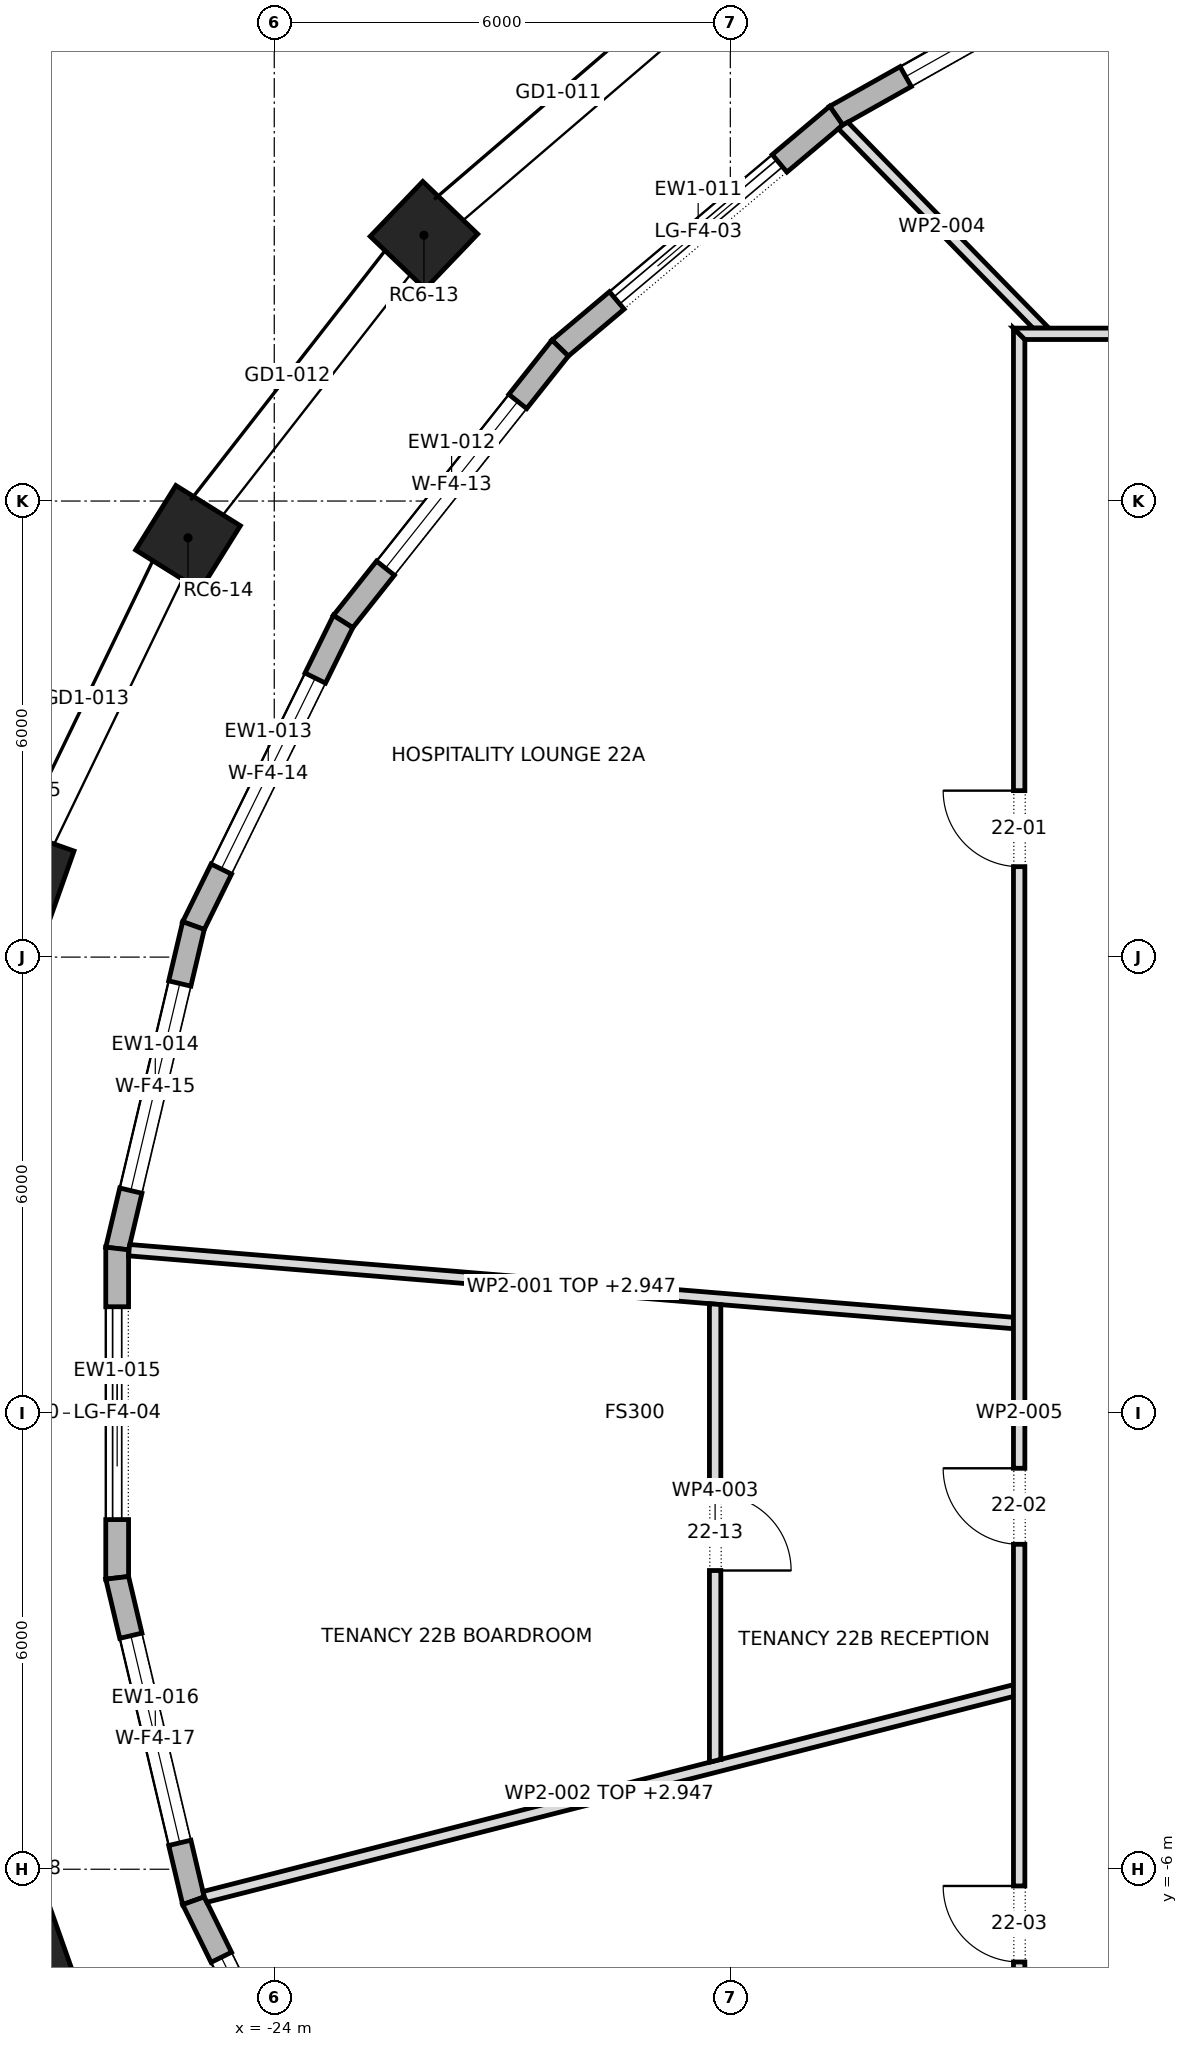
"""IFC4 building model, lengths in metres.
Left out: names, types, materials, properties, quantities, classifications, styles, units other than length and angle.
Written with IfcOpenShell. Run it as: python <this file> out.ifc"""

import sys

from ifc_helpers import new_model, si_unit, direction, frame, frame_2d, origin, origin_2d, place, context, subcontext, project, spatial, polyline, rectangle, outline, extrude, element, fill, save


model = new_model("IFC4")
c1 = context("Model", 3, precision=1e-05, world=origin(), true_north=direction((0.0, 1.0)))
c2 = subcontext(c1, "Body", "Model", "MODEL_VIEW")
j1 = project(units=[si_unit("LENGTHUNIT", "METRE"), si_unit("PLANEANGLEUNIT", "RADIAN")], contexts=[c1])
p1 = place(None, origin())
s1 = spatial("IfcSite", under=j1, at=p1, CompositionType="ELEMENT")
p2 = place(p1, origin())
s2 = spatial("IfcBuilding", under=s1, at=p2, CompositionType="ELEMENT")
p3 = place(p2, frame((0.0, 0.0, 312.3)))
s3 = spatial("IfcBuildingStorey", under=s2, at=p3, CompositionType="ELEMENT", Elevation=312.3)
for number, where, z_axis, x_axis in (
    (1, (-22.031, 15.497, 0.0), (0.0, 0.0, 1.0), (-0.692, -0.722, 0.0)),
    (2, (-25.135, 11.516, 0.0), (0.0, 0.0, 1.0), (-0.529, -0.849, 0.0)),
    (3, (-27.273, 7.091, 0.0), (0.0, 0.0, 1.0), (-0.334, -0.943, 0.0)),
    (4, (-27.273, -7.091, 0.0), (0.0, 0.0, 1.0), (0.334, -0.943, 0.0)),
):
    element("IfcColumn", number, at=place(p3, frame(where, z_axis=z_axis, x_axis=x_axis)), inside=s3, PredefinedType="COLUMN", context=c2, shape_type="SweptSolid", body=[
        extrude(rectangle(XDim=1.0, YDim=1.0, at=origin_2d()), origin(), (0.0, 0.0, 1.0), 4.0),
    ])
p4 = place(p3, frame((-12.338, 19.471, 0.0), z_axis=(0.0, 0.0, 1.0), x_axis=(-0.871570211895, -0.490270706588, 0.0)))
e5 = element("IfcWall", 5, at=p4, inside=s3, PredefinedType="STANDARD", context=c2, shape_type="SweptSolid", body=[
    extrude(outline(polyline([(-0.013, -0.15), (4.912, -0.15), (4.883, 0.15), (0.013, 0.15), (-0.013, -0.15)])), origin(), (0.0, 0.0, 1.0), 3.7),
])
p5 = place(p4, frame((1.049, 0.0, 0.6)))
e6 = element("IfcOpeningElement", 6, at=p5, cuts=e5, PredefinedType="OPENING", context=c2, shape_type="SweptSolid", body=[
    extrude(rectangle(XDim=2.8, YDim=2.65, at=frame_2d((1.4, 1.325))), frame((0.0, 0.162, 0.0), z_axis=(0.0, -1.0, 0.0), x_axis=(1.0, 0.0, 0.0)), (0.0, 0.0, 1.0), 0.324),
])
p6 = place(p3, frame((-16.607, 17.07, 0.0), z_axis=(0.0, 0.0, 1.0), x_axis=(-0.765059193792, -0.643959959931, 0.0)))
e7 = element("IfcWall", 7, at=p6, inside=s3, PredefinedType="STANDARD", context=c2, shape_type="SweptSolid", body=[
    extrude(outline(polyline([(-0.014, -0.15), (4.763, -0.15), (4.733, 0.15), (0.014, 0.15), (-0.014, -0.15)])), origin(), (0.0, 0.0, 1.0), 3.7),
])
p7 = place(p6, frame((0.974, 0.0, 0.0)))
e8 = element("IfcOpeningElement", 8, at=p7, cuts=e7, PredefinedType="OPENING", context=c2, shape_type="SweptSolid", body=[
    extrude(rectangle(XDim=2.8, YDim=3.25, at=frame_2d((1.4, 1.625))), frame((0.0, 0.162, 0.0), z_axis=(0.0, -1.0, 0.0), x_axis=(1.0, 0.0, 0.0)), (0.0, 0.0, 1.0), 0.324),
])
p8 = place(p3, frame((-20.239, 14.012, 0.0), z_axis=(0.0, 0.0, 1.0), x_axis=(-0.621682706372, -0.78326918272, 0.0)))
e9 = element("IfcWall", 9, at=p8, inside=s3, PredefinedType="STANDARD", context=c2, shape_type="SweptSolid", body=[
    extrude(outline(polyline([(-0.015, -0.15), (4.609, -0.15), (4.577, 0.15), (0.015, 0.15), (-0.015, -0.15)])), origin(), (0.0, 0.0, 1.0), 3.7),
])
p9 = place(p8, frame((0.896, 0.0, 0.6)))
e10 = element("IfcOpeningElement", 10, at=p9, cuts=e9, PredefinedType="OPENING", context=c2, shape_type="SweptSolid", body=[
    extrude(rectangle(XDim=2.8, YDim=2.65, at=frame_2d((1.4, 1.325))), frame((0.0, 0.162, 0.0), z_axis=(0.0, -1.0, 0.0), x_axis=(1.0, 0.0, 0.0)), (0.0, 0.0, 1.0), 0.324),
])
p10 = place(p3, frame((-23.094, 10.415, 0.0), z_axis=(0.0, 0.0, 1.0), x_axis=(-0.441509050872, -0.897256796017, 0.0)))
e11 = element("IfcWall", 11, at=p10, inside=s3, PredefinedType="STANDARD", context=c2, shape_type="SweptSolid", body=[
    extrude(outline(polyline([(-0.016, -0.15), (4.475, -0.15), (4.441, 0.15), (0.016, 0.15), (-0.016, -0.15)])), origin(), (0.0, 0.0, 1.0), 3.7),
])
p11 = place(p10, frame((0.829, 0.0, 0.6)))
e12 = element("IfcOpeningElement", 12, at=p11, cuts=e11, PredefinedType="OPENING", context=c2, shape_type="SweptSolid", body=[
    extrude(rectangle(XDim=2.8, YDim=2.65, at=frame_2d((1.4, 1.325))), frame((0.0, 0.162, 0.0), z_axis=(0.0, -1.0, 0.0), x_axis=(1.0, 0.0, 0.0)), (0.0, 0.0, 1.0), 0.324),
])
p12 = place(p3, frame((-25.063, 6.415, 0.0), z_axis=(0.0, 0.0, 1.0), x_axis=(-0.229974411334, -0.973196675977, 0.0)))
e13 = element("IfcWall", 13, at=p12, inside=s3, PredefinedType="STANDARD", context=c2, shape_type="SweptSolid", body=[
    extrude(outline(polyline([(-0.017, -0.15), (4.383, -0.15), (4.348, 0.15), (0.017, 0.15), (-0.017, -0.15)])), origin(), (0.0, 0.0, 1.0), 3.7),
])
p13 = place(p12, frame((0.783, 0.0, 0.6)))
e14 = element("IfcOpeningElement", 14, at=p13, cuts=e13, PredefinedType="OPENING", context=c2, shape_type="SweptSolid", body=[
    extrude(rectangle(XDim=2.8, YDim=2.65, at=frame_2d((1.4, 1.325))), frame((0.0, 0.162, 0.0), z_axis=(0.0, -1.0, 0.0), x_axis=(1.0, 0.0, 0.0)), (0.0, 0.0, 1.0), 0.324),
])
p14 = place(p3, frame((-26.067, 2.166, 0.0), z_axis=(0.0, 0.0, 1.0), x_axis=(0.0, -1.0, 0.0)))
e15 = element("IfcWall", 15, at=p14, inside=s3, PredefinedType="STANDARD", context=c2, shape_type="SweptSolid", body=[
    extrude(outline(polyline([(-0.018, -0.15), (4.35, -0.15), (4.315, 0.15), (0.018, 0.15), (-0.018, -0.15)])), origin(), (0.0, 0.0, 1.0), 3.7),
])
p15 = place(p14, frame((0.766, 0.0, 0.0)))
e16 = element("IfcOpeningElement", 16, at=p15, cuts=e15, PredefinedType="OPENING", context=c2, shape_type="SweptSolid", body=[
    extrude(rectangle(XDim=2.8, YDim=3.25, at=frame_2d((1.4, 1.625))), frame((0.0, 0.162, 0.0), z_axis=(0.0, -1.0, 0.0), x_axis=(1.0, 0.0, 0.0)), (0.0, 0.0, 1.0), 0.324),
])
p16 = place(p3, frame((-26.067, -2.166, 0.0), z_axis=(0.0, 0.0, 1.0), x_axis=(0.229974411334, -0.973196675977, 0.0)))
e17 = element("IfcWall", 17, at=p16, inside=s3, PredefinedType="STANDARD", context=c2, shape_type="SweptSolid", body=[
    extrude(outline(polyline([(-0.018, -0.15), (4.382, -0.15), (4.348, 0.15), (0.018, 0.15), (-0.018, -0.15)])), origin(), (0.0, 0.0, 1.0), 3.7),
])
p17 = place(p16, frame((0.783, 0.0, 0.6)))
e18 = element("IfcOpeningElement", 18, at=p17, cuts=e17, PredefinedType="OPENING", context=c2, shape_type="SweptSolid", body=[
    extrude(rectangle(XDim=2.8, YDim=2.65, at=frame_2d((1.4, 1.325))), frame((0.0, 0.162, 0.0), z_axis=(0.0, -1.0, 0.0), x_axis=(1.0, 0.0, 0.0)), (0.0, 0.0, 1.0), 0.324),
])
p18 = place(p3, frame((-25.063, -6.415, 0.0), z_axis=(0.0, 0.0, 1.0), x_axis=(0.441509050872, -0.897256796017, 0.0)))
e19 = element("IfcWall", 19, at=p18, inside=s3, PredefinedType="STANDARD", context=c2, shape_type="SweptSolid", body=[
    extrude(outline(polyline([(-0.017, -0.15), (4.474, -0.15), (4.442, 0.15), (0.017, 0.15), (-0.017, -0.15)])), origin(), (0.0, 0.0, 1.0), 3.7),
])
p19 = place(p18, frame((0.829, 0.0, 0.6)))
e20 = element("IfcOpeningElement", 20, at=p19, cuts=e19, PredefinedType="OPENING", context=c2, shape_type="SweptSolid", body=[
    extrude(rectangle(XDim=2.8, YDim=2.65, at=frame_2d((1.4, 1.325))), frame((0.0, 0.162, 0.0), z_axis=(0.0, -1.0, 0.0), x_axis=(1.0, 0.0, 0.0)), (0.0, 0.0, 1.0), 0.324),
])
p20 = place(p3, frame((-25.91, 2.145, 0.0), z_axis=(0.0, 0.0, 1.0), x_axis=(0.996625584757, -0.082081933503, 0.0)))
e21 = element("IfcWall", 21, at=p20, inside=s3, PredefinedType="PARTITIONING", context=c2, shape_type="SweptSolid", body=[
    extrude(outline(polyline([(11.68, -0.075), (11.68, -0.068), (11.668, 0.075), (9.724, 0.075), (7.78, 0.075), (5.836, 0.075), (3.892, 0.075), (1.948, 0.075), (0.004, 0.075), (0.0, 0.049), (0.0, -0.075), (1.947, -0.075), (3.893, -0.075), (5.84, -0.075), (7.787, -0.075), (9.733, -0.075), (11.68, -0.075)])), origin(), (0.0, 0.0, 1.0), 2.947),
])
p21 = place(p3, frame((-24.919, -6.365, 0.0), z_axis=(0.0, 0.0, 1.0), x_axis=(0.968945878768, 0.247272893819, 0.0)))
e22 = element("IfcWall", 22, at=p21, inside=s3, PredefinedType="PARTITIONING", context=c2, shape_type="SweptSolid", body=[
    extrude(outline(polyline([(0.015, -0.075), (1.84, -0.075), (3.665, -0.075), (5.49, -0.075), (7.315, -0.075), (9.141, -0.075), (10.966, -0.075), (11.004, 0.075), (11.004, 0.075), (9.017, 0.075), (7.031, 0.075), (7.031, 0.074), (7.028, 0.075), (5.271, 0.075), (3.514, 0.075), (1.757, 0.075), (0.0, 0.075), (0.0, -0.005), (0.015, -0.075)])), origin(), (0.0, 0.0, 1.0), 2.947),
])
p22 = place(p3, frame((-18.2, -4.593, 0.0), z_axis=(0.0, 0.0, 1.0), x_axis=(0.0, 1.0, 0.0)))
e23 = element("IfcWall", 23, at=p22, inside=s3, PredefinedType="PARTITIONING", context=c2, shape_type="SweptSolid", body=[
    extrude(outline(polyline([(0.038, -0.075), (2.032, -0.075), (4.026, -0.075), (6.021, -0.075), (6.032, 0.07), (6.032, 0.075), (4.524, 0.075), (3.016, 0.075), (1.508, 0.075), (0.0, 0.075), (0.0, 0.075), (0.038, -0.075)])), origin(), (0.0, 0.0, 1.0), 3.7),
])
p23 = place(p22, frame((2.522, 0.0, 0.0)))
e24 = element("IfcOpeningElement", 24, at=p23, cuts=e23, PredefinedType="OPENING", context=c2, shape_type="SweptSolid", body=[
    extrude(rectangle(XDim=1.0, YDim=2.1, at=frame_2d((0.5, 1.05))), frame((0.0, 0.087, 0.0), z_axis=(0.0, -1.0, 0.0), x_axis=(1.0, 0.0, 0.0)), (0.0, 0.0, 1.0), 0.174),
])
p24 = place(p3, frame((-16.525, 16.95, 0.0), z_axis=(0.0, 0.0, 1.0), x_axis=(0.698599984797, -0.715512446602, 0.0)))
e25 = element("IfcWall", 25, at=p24, inside=s3, PredefinedType="PARTITIONING", context=c2, shape_type="SweptSolid", body=[
    extrude(outline(polyline([(0.0, -0.075), (1.833, -0.075), (3.665, -0.075), (3.811, 0.075), (3.811, 0.075), (1.918, 0.075), (0.025, 0.075), (0.005, 0.0), (0.0, -0.074), (0.0, -0.075)])), origin(), (0.0, 0.0, 1.0), 3.7),
])
p25 = place(p3, frame((-14.2, -14.275, 0.0), z_axis=(0.0, 0.0, 1.0), x_axis=(0.0, 1.0, 0.0)))
e26 = element("IfcWall", 26, at=p25, inside=s3, PredefinedType="PARTITIONING", context=c2, shape_type="SweptSolid", body=[
    extrude(outline(polyline([(0.15, -0.075), (2.033, -0.075), (3.917, -0.075), (5.8, -0.075), (7.683, -0.075), (9.567, -0.075), (11.45, -0.075), (13.333, -0.075), (15.217, -0.075), (17.1, -0.075), (18.983, -0.075), (20.866, -0.075), (22.75, -0.075), (24.633, -0.075), (26.517, -0.075), (28.4, -0.075), (28.55, 0.075), (28.55, 0.075), (26.646, 0.075), (24.743, 0.075), (22.84, 0.075), (20.937, 0.075), (19.033, 0.075), (17.13, 0.075), (15.227, 0.075), (13.323, 0.075), (11.42, 0.075), (9.517, 0.075), (7.613, 0.075), (5.71, 0.075), (3.807, 0.075), (1.903, 0.075), (0.0, 0.075), (0.15, -0.075)])), origin(), (0.0, 0.0, 1.0), 3.7),
])
p26 = place(p25, frame((21.465, 0.0, 0.0)))
e27 = element("IfcOpeningElement", 27, at=p26, cuts=e26, PredefinedType="OPENING", context=c2, shape_type="SweptSolid", body=[
    extrude(rectangle(XDim=1.0, YDim=2.1, at=frame_2d((0.5, 1.05))), frame((0.0, 0.087, 0.0), z_axis=(0.0, -1.0, 0.0), x_axis=(1.0, 0.0, 0.0)), (0.0, 0.0, 1.0), 0.174),
])
p27 = place(p25, frame((12.55, 0.0, 0.0)))
e28 = element("IfcOpeningElement", 28, at=p27, cuts=e26, PredefinedType="OPENING", context=c2, shape_type="SweptSolid", body=[
    extrude(rectangle(XDim=1.0, YDim=2.1, at=frame_2d((0.5, 1.05))), frame((0.0, 0.087, 0.0), z_axis=(0.0, -1.0, 0.0), x_axis=(1.0, 0.0, 0.0)), (0.0, 0.0, 1.0), 0.174),
])
p28 = place(p25, frame((7.055, 0.0, 0.0)))
e29 = element("IfcOpeningElement", 29, at=p28, cuts=e26, PredefinedType="OPENING", context=c2, shape_type="SweptSolid", body=[
    extrude(rectangle(XDim=1.0, YDim=2.1, at=frame_2d((0.5, 1.05))), frame((0.0, 0.087, 0.0), z_axis=(0.0, -1.0, 0.0), x_axis=(1.0, 0.0, 0.0)), (0.0, 0.0, 1.0), 0.174),
])
p29 = place(p3, frame((-14.275, 14.2, 0.0), z_axis=(0.0, 0.0, 1.0), x_axis=(1.0, 0.0, 0.0)))
e30 = element("IfcWall", 30, at=p29, inside=s3, PredefinedType="PARTITIONING", context=c2, shape_type="SweptSolid", body=[
    extrude(outline(polyline([(0.15, -0.075), (2.033, -0.075), (3.917, -0.075), (5.8, -0.075), (7.683, -0.075), (9.567, -0.075), (11.45, -0.075), (13.333, -0.075), (15.217, -0.075), (17.1, -0.075), (18.983, -0.075), (20.866, -0.075), (22.75, -0.075), (24.633, -0.075), (26.517, -0.075), (28.4, -0.075), (28.55, 0.075), (28.55, 0.075), (26.646, 0.075), (24.743, 0.075), (22.84, 0.075), (20.937, 0.075), (19.033, 0.075), (17.13, 0.075), (15.227, 0.075), (13.323, 0.075), (11.42, 0.075), (9.517, 0.075), (7.613, 0.075), (5.71, 0.075), (3.807, 0.075), (1.903, 0.075), (0.0, 0.075), (0.15, -0.075)])), origin(), (0.0, 0.0, 1.0), 3.7),
])
p30 = place(p29, frame((20.045, 0.0, 0.0)))
e31 = element("IfcOpeningElement", 31, at=p30, cuts=e30, PredefinedType="OPENING", context=c2, shape_type="SweptSolid", body=[
    extrude(rectangle(XDim=1.0, YDim=2.1, at=frame_2d((0.5, 1.05))), frame((0.0, 0.087, 0.0), z_axis=(0.0, -1.0, 0.0), x_axis=(1.0, 0.0, 0.0)), (0.0, 0.0, 1.0), 0.174),
])
p31 = place(p29, frame((6.025, 0.0, 0.0)))
e32 = element("IfcOpeningElement", 32, at=p31, cuts=e30, PredefinedType="OPENING", context=c2, shape_type="SweptSolid", body=[
    extrude(rectangle(XDim=1.0, YDim=2.1, at=frame_2d((0.5, 1.05))), frame((0.0, 0.087, 0.0), z_axis=(0.0, -1.0, 0.0), x_axis=(1.0, 0.0, 0.0)), (0.0, 0.0, 1.0), 0.174),
])
p32 = place(p5, origin())
e33 = element("IfcWindow", 33, at=p32, inside=s3, PartitioningType="DOUBLE_PANEL_VERTICAL", PredefinedType="WINDOW", context=c2, shape_type="SweptSolid", body=[
    extrude(rectangle(XDim=2.8, YDim=2.65, at=frame_2d((1.4, 1.325))), frame((0.0, 0.03, 0.0), z_axis=(0.0, -1.0, 0.0), x_axis=(1.0, 0.0, 0.0)), (0.0, 0.0, 1.0), 0.06),
])
fill(e6, e33)
p33 = place(p7, origin())
e34 = element("IfcDoor", 34, at=p33, inside=s3, OperationType="DOUBLE_DOOR_SLIDING", PredefinedType="DOOR", context=c2, shape_type="SweptSolid", body=[
    extrude(rectangle(XDim=2.8, YDim=3.25, at=frame_2d((1.4, 1.625))), frame((0.0, 0.025, 0.0), z_axis=(0.0, -1.0, 0.0), x_axis=(1.0, 0.0, 0.0)), (0.0, 0.0, 1.0), 0.05),
])
fill(e8, e34)
p34 = place(p9, origin())
e35 = element("IfcWindow", 35, at=p34, inside=s3, PartitioningType="DOUBLE_PANEL_VERTICAL", PredefinedType="WINDOW", context=c2, shape_type="SweptSolid", body=[
    extrude(rectangle(XDim=2.8, YDim=2.65, at=frame_2d((1.4, 1.325))), frame((0.0, 0.03, 0.0), z_axis=(0.0, -1.0, 0.0), x_axis=(1.0, 0.0, 0.0)), (0.0, 0.0, 1.0), 0.06),
])
fill(e10, e35)
p35 = place(p11, origin())
e36 = element("IfcWindow", 36, at=p35, inside=s3, PartitioningType="DOUBLE_PANEL_VERTICAL", PredefinedType="WINDOW", context=c2, shape_type="SweptSolid", body=[
    extrude(rectangle(XDim=2.8, YDim=2.65, at=frame_2d((1.4, 1.325))), frame((0.0, 0.03, 0.0), z_axis=(0.0, -1.0, 0.0), x_axis=(1.0, 0.0, 0.0)), (0.0, 0.0, 1.0), 0.06),
])
fill(e12, e36)
p36 = place(p13, origin())
e37 = element("IfcWindow", 37, at=p36, inside=s3, PartitioningType="DOUBLE_PANEL_VERTICAL", PredefinedType="WINDOW", context=c2, shape_type="SweptSolid", body=[
    extrude(rectangle(XDim=2.8, YDim=2.65, at=frame_2d((1.4, 1.325))), frame((0.0, 0.03, 0.0), z_axis=(0.0, -1.0, 0.0), x_axis=(1.0, 0.0, 0.0)), (0.0, 0.0, 1.0), 0.06),
])
fill(e14, e37)
p37 = place(p15, origin())
e38 = element("IfcDoor", 38, at=p37, inside=s3, OperationType="DOUBLE_DOOR_SLIDING", PredefinedType="DOOR", context=c2, shape_type="SweptSolid", body=[
    extrude(rectangle(XDim=2.8, YDim=3.25, at=frame_2d((1.4, 1.625))), frame((0.0, 0.025, 0.0), z_axis=(0.0, -1.0, 0.0), x_axis=(1.0, 0.0, 0.0)), (0.0, 0.0, 1.0), 0.05),
])
fill(e16, e38)
p38 = place(p17, origin())
e39 = element("IfcWindow", 39, at=p38, inside=s3, PartitioningType="DOUBLE_PANEL_VERTICAL", PredefinedType="WINDOW", context=c2, shape_type="SweptSolid", body=[
    extrude(rectangle(XDim=2.8, YDim=2.65, at=frame_2d((1.4, 1.325))), frame((0.0, 0.03, 0.0), z_axis=(0.0, -1.0, 0.0), x_axis=(1.0, 0.0, 0.0)), (0.0, 0.0, 1.0), 0.06),
])
fill(e18, e39)
p39 = place(p19, origin())
e40 = element("IfcWindow", 40, at=p39, inside=s3, PartitioningType="DOUBLE_PANEL_VERTICAL", PredefinedType="WINDOW", context=c2, shape_type="SweptSolid", body=[
    extrude(rectangle(XDim=2.8, YDim=2.65, at=frame_2d((1.4, 1.325))), frame((0.0, 0.03, 0.0), z_axis=(0.0, -1.0, 0.0), x_axis=(1.0, 0.0, 0.0)), (0.0, 0.0, 1.0), 0.06),
])
fill(e20, e40)
p40 = place(p26, origin())
e41 = element("IfcDoor", 41, at=p40, inside=s3, OperationType="SINGLE_SWING_LEFT", PredefinedType="DOOR", context=c2, shape_type="SweptSolid", body=[
    extrude(rectangle(XDim=1.0, YDim=2.1, at=frame_2d((0.5, 1.05))), frame((0.0, 0.025, 0.0), z_axis=(0.0, -1.0, 0.0), x_axis=(1.0, 0.0, 0.0)), (0.0, 0.0, 1.0), 0.05),
])
fill(e27, e41)
p41 = place(p27, origin())
e42 = element("IfcDoor", 42, at=p41, inside=s3, OperationType="SINGLE_SWING_LEFT", PredefinedType="DOOR", context=c2, shape_type="SweptSolid", body=[
    extrude(rectangle(XDim=1.0, YDim=2.1, at=frame_2d((0.5, 1.05))), frame((0.0, 0.025, 0.0), z_axis=(0.0, -1.0, 0.0), x_axis=(1.0, 0.0, 0.0)), (0.0, 0.0, 1.0), 0.05),
])
fill(e28, e42)
p42 = place(p28, origin())
e43 = element("IfcDoor", 43, at=p42, inside=s3, OperationType="SINGLE_SWING_LEFT", PredefinedType="DOOR", context=c2, shape_type="SweptSolid", body=[
    extrude(rectangle(XDim=1.0, YDim=2.1, at=frame_2d((0.5, 1.05))), frame((0.0, 0.025, 0.0), z_axis=(0.0, -1.0, 0.0), x_axis=(1.0, 0.0, 0.0)), (0.0, 0.0, 1.0), 0.05),
])
fill(e29, e43)
p43 = place(p23, frame((1.0, 0.0, 0.0), z_axis=(0.0, 0.0, 1.0), x_axis=(-1.0, 0.0, 0.0)))
e44 = element("IfcDoor", 44, at=p43, inside=s3, OperationType="SINGLE_SWING_LEFT", PredefinedType="DOOR", context=c2, shape_type="SweptSolid", body=[
    extrude(rectangle(XDim=1.0, YDim=2.1, at=frame_2d((0.5, 1.05))), frame((0.0, 0.025, 0.0), z_axis=(0.0, -1.0, 0.0), x_axis=(1.0, 0.0, 0.0)), (0.0, 0.0, 1.0), 0.05),
])
fill(e24, e44)
save(model, sys.argv[1])
